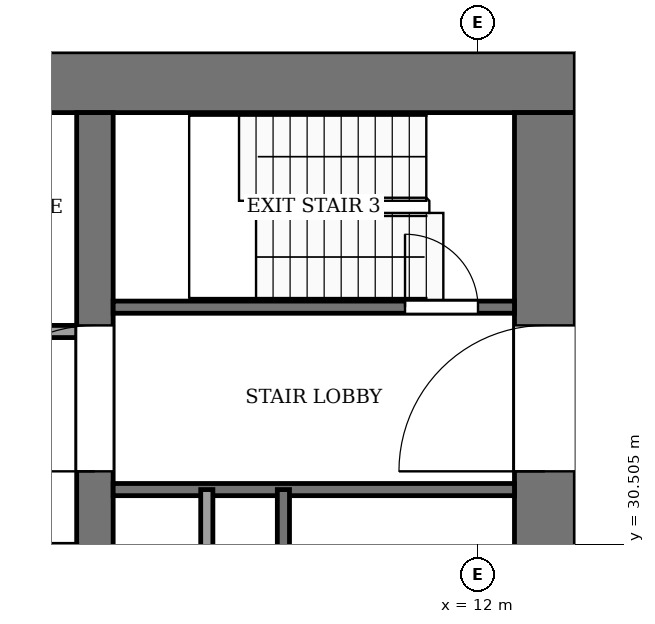
"""IFC4 building model, lengths in metres.
Left out: names, types, materials, properties, quantities, classifications, styles, units other than length and angle.
Written with IfcOpenShell. Run it as: python <this file> out.ifc"""

import sys

from ifc_helpers import new_model, si_unit, direction, frame, frame_2d, origin, place, context, subcontext, project, spatial, rectangle, extrude, element, fill, save


model = new_model("IFC4")
c1 = context("Model", 3, precision=1e-05, world=origin(), true_north=direction((0.0, 1.0)))
c2 = subcontext(c1, "Body", "Model", "MODEL_VIEW")
j1 = project(units=[si_unit("LENGTHUNIT", "METRE"), si_unit("PLANEANGLEUNIT", "RADIAN")], contexts=[c1])
p1 = place(None, origin())
s1 = spatial("IfcSite", under=j1, at=p1, CompositionType="ELEMENT")
p2 = place(p1, origin())
s2 = spatial("IfcBuilding", under=s1, at=p2, CompositionType="ELEMENT")
p3 = place(p2, frame((0.0, 0.0, 130.0)))
s3 = spatial("IfcBuildingStorey", under=s2, at=p3, CompositionType="ELEMENT", Elevation=130.0)
p4 = place(p3, frame((-13.6, 38.1, -0.13), z_axis=(0.0, 0.0, 1.0), x_axis=(1.0, 0.0, 0.0)))
e1 = element("IfcWall", 1, at=p4, inside=s3, PredefinedType="SHEAR", context=c2, shape_type="SweptSolid", body=[
    extrude(rectangle(XDim=27.2, YDim=1.0, at=frame_2d((13.6, 0.0))), origin(), (0.0, 0.0, 1.0), 4.0),
])
p5 = place(p3, frame((13.1, 18.4, -0.13), z_axis=(0.0, 0.0, 1.0), x_axis=(0.0, 1.0, 0.0)))
e2 = element("IfcWall", 2, at=p5, inside=s3, PredefinedType="SHEAR", context=c2, shape_type="SweptSolid", body=[
    extrude(rectangle(XDim=19.2, YDim=1.0, at=frame_2d((9.6, 0.0))), origin(), (0.0, 0.0, 1.0), 4.0),
])
p6 = place(p5, frame((2.8, 0.0, 0.13)))
e3 = element("IfcOpeningElement", 3, at=p6, cuts=e2, PredefinedType="OPENING", context=c2, shape_type="SweptSolid", body=[
    extrude(rectangle(XDim=2.4, YDim=2.4, at=frame_2d((1.2, 1.2))), frame((0.0, 0.51, 0.0), z_axis=(0.0, -1.0, 0.0), x_axis=(1.0, 0.0, 0.0)), (0.0, 0.0, 1.0), 1.02),
])
p7 = place(p5, frame((13.3, 0.0, 0.13)))
e4 = element("IfcOpeningElement", 4, at=p7, cuts=e2, PredefinedType="OPENING", context=c2, shape_type="SweptSolid", body=[
    extrude(rectangle(XDim=2.4, YDim=2.4, at=frame_2d((1.2, 1.2))), frame((0.0, 0.51, 0.0), z_axis=(0.0, -1.0, 0.0), x_axis=(1.0, 0.0, 0.0)), (0.0, 0.0, 1.0), 1.02),
])
p8 = place(p3, frame((5.7, 18.4, -0.13), z_axis=(0.0, 0.0, 1.0), x_axis=(0.0, 1.0, 0.0)))
e5 = element("IfcWall", 5, at=p8, inside=s3, PredefinedType="SHEAR", context=c2, shape_type="SweptSolid", body=[
    extrude(rectangle(XDim=19.2, YDim=0.6, at=frame_2d((9.6, 0.0))), origin(), (0.0, 0.0, 1.0), 4.0),
])
p9 = place(p8, frame((8.35, 0.0, 0.13)))
e6 = element("IfcOpeningElement", 6, at=p9, cuts=e5, PredefinedType="OPENING", context=c2, shape_type="SweptSolid", body=[
    extrude(rectangle(XDim=0.9, YDim=2.1, at=frame_2d((0.45, 1.05))), frame((0.0, 0.31, 0.0), z_axis=(0.0, -1.0, 0.0), x_axis=(1.0, 0.0, 0.0)), (0.0, 0.0, 1.0), 0.62),
])
p10 = place(p8, frame((13.3, 0.0, 0.13)))
e7 = element("IfcOpeningElement", 7, at=p10, cuts=e5, PredefinedType="OPENING", context=c2, shape_type="SweptSolid", body=[
    extrude(rectangle(XDim=2.4, YDim=2.4, at=frame_2d((1.2, 1.2))), frame((0.0, 0.31, 0.0), z_axis=(0.0, -1.0, 0.0), x_axis=(1.0, 0.0, 0.0)), (0.0, 0.0, 1.0), 0.62),
])
p11 = place(p3, frame((6.0, 31.4, 0.0), z_axis=(0.0, 0.0, 1.0), x_axis=(1.0, 0.0, 0.0)))
e8 = element("IfcWall", 8, at=p11, inside=s3, PredefinedType="PARTITIONING", context=c2, shape_type="SweptSolid", body=[
    extrude(rectangle(XDim=6.6, YDim=0.2, at=frame_2d((3.3, 0.0))), origin(), (0.0, 0.0, 1.0), 3.87),
])
p12 = place(p3, frame((-5.4, 34.0, 0.0), z_axis=(0.0, 0.0, 1.0), x_axis=(1.0, 0.0, 0.0)))
e9 = element("IfcWall", 9, at=p12, inside=s3, PredefinedType="PARTITIONING", context=c2, shape_type="SweptSolid", body=[
    extrude(rectangle(XDim=10.8, YDim=0.2, at=frame_2d((5.4, 0.0))), origin(), (0.0, 0.0, 1.0), 3.87),
])
p13 = place(p12, frame((6.15, 0.0, 0.0)))
e10 = element("IfcOpeningElement", 10, at=p13, cuts=e9, PredefinedType="OPENING", context=c2, shape_type="SweptSolid", body=[
    extrude(rectangle(XDim=1.2, YDim=2.2, at=frame_2d((0.6, 1.1))), frame((0.0, 0.11, 0.0), z_axis=(0.0, -1.0, 0.0), x_axis=(1.0, 0.0, 0.0)), (0.0, 0.0, 1.0), 0.22),
])
p14 = place(p12, frame((8.95, 0.0, 0.0)))
e11 = element("IfcOpeningElement", 11, at=p14, cuts=e9, PredefinedType="OPENING", context=c2, shape_type="SweptSolid", body=[
    extrude(rectangle(XDim=1.0, YDim=2.1, at=frame_2d((0.5, 1.05))), frame((0.0, 0.11, 0.0), z_axis=(0.0, -1.0, 0.0), x_axis=(1.0, 0.0, 0.0)), (0.0, 0.0, 1.0), 0.22),
])
p15 = place(p3, frame((6.0, 34.4, 0.0), z_axis=(0.0, 0.0, 1.0), x_axis=(1.0, 0.0, 0.0)))
e12 = element("IfcWall", 12, at=p15, inside=s3, PredefinedType="PARTITIONING", context=c2, shape_type="SweptSolid", body=[
    extrude(rectangle(XDim=6.6, YDim=0.2, at=frame_2d((3.3, 0.0))), origin(), (0.0, 0.0, 1.0), 3.87),
])
p16 = place(p15, frame((4.8, 0.0, 0.0)))
e13 = element("IfcOpeningElement", 13, at=p16, cuts=e12, PredefinedType="OPENING", context=c2, shape_type="SweptSolid", body=[
    extrude(rectangle(XDim=1.2, YDim=2.2, at=frame_2d((0.6, 1.1))), frame((0.0, 0.11, 0.0), z_axis=(0.0, -1.0, 0.0), x_axis=(1.0, 0.0, 0.0)), (0.0, 0.0, 1.0), 0.22),
])
for number, where, z_axis, x_axis in (
    (14, (7.54, 24.0, 0.0), (0.0, 0.0, 1.0), (0.0, 1.0, 0.0)),
    (15, (8.8, 24.0, 0.0), (0.0, 0.0, 1.0), (0.0, 1.0, 0.0)),
):
    element("IfcWall", number, at=place(p3, frame(where, z_axis=z_axis, x_axis=x_axis)), inside=s3, PredefinedType="PARTITIONING", context=c2, shape_type="SweptSolid", body=[
        extrude(rectangle(XDim=7.4, YDim=0.2, at=frame_2d((3.7, 0.0))), origin(), (0.0, 0.0, 1.0), 3.87),
    ])
p17 = place(p16, origin())
e16 = element("IfcDoor", 16, at=p17, inside=s3, OperationType="SINGLE_SWING_LEFT", PredefinedType="DOOR", context=c2, shape_type="SweptSolid", body=[
    extrude(rectangle(XDim=1.2, YDim=2.2, at=frame_2d((0.6, 1.1))), frame((0.0, 0.025, 0.0), z_axis=(0.0, -1.0, 0.0), x_axis=(1.0, 0.0, 0.0)), (0.0, 0.0, 1.0), 0.05),
])
fill(e13, e16)
p18 = place(p10, origin())
e17 = element("IfcDoor", 17, at=p18, inside=s3, OperationType="DOUBLE_DOOR_SINGLE_SWING", PredefinedType="DOOR", context=c2, shape_type="SweptSolid", body=[
    extrude(rectangle(XDim=2.4, YDim=2.4, at=frame_2d((1.2, 1.2))), frame((0.0, 0.025, 0.0), z_axis=(0.0, -1.0, 0.0), x_axis=(1.0, 0.0, 0.0)), (0.0, 0.0, 1.0), 0.05),
])
fill(e7, e17)
p19 = place(p7, origin())
e18 = element("IfcDoor", 18, at=p19, inside=s3, OperationType="DOUBLE_DOOR_SINGLE_SWING", PredefinedType="DOOR", context=c2, shape_type="SweptSolid", body=[
    extrude(rectangle(XDim=2.4, YDim=2.4, at=frame_2d((1.2, 1.2))), frame((0.0, 0.025, 0.0), z_axis=(0.0, -1.0, 0.0), x_axis=(1.0, 0.0, 0.0)), (0.0, 0.0, 1.0), 0.05),
])
fill(e4, e18)
save(model, sys.argv[1])
